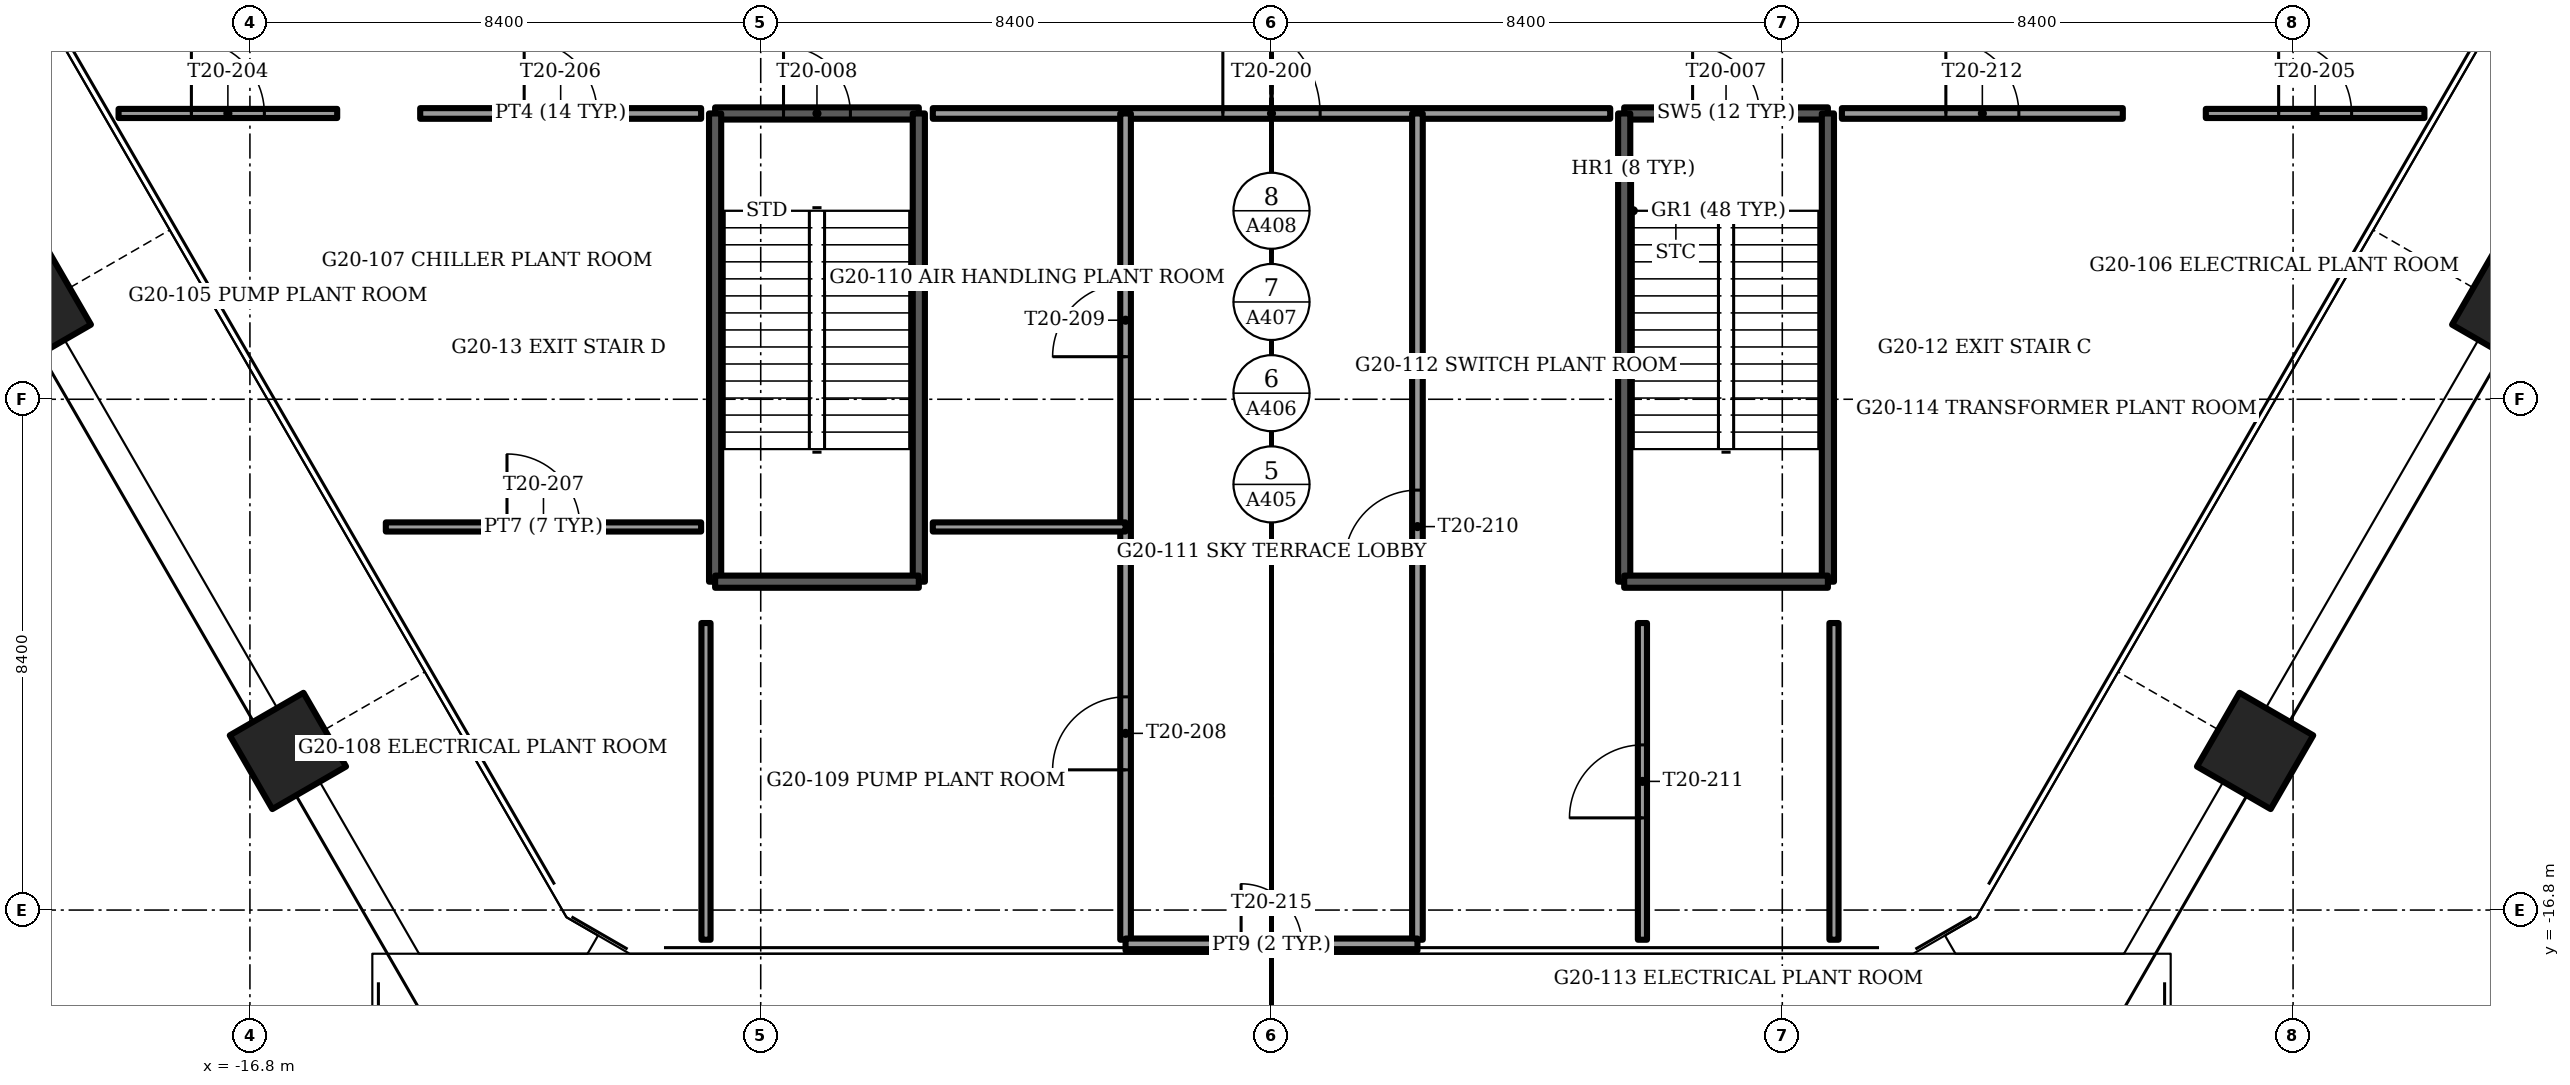
"""IFC4 building model, lengths in metres.
Left out: names, types, materials, properties, quantities, classifications, styles, units other than length and angle.
Written with IfcOpenShell. Run it as: python <this file> out.ifc"""

import sys

from ifc_helpers import new_model, si_unit, direction, frame, frame_2d, origin, origin_2d, place, context, subcontext, project, spatial, rectangle, extrude, element, fill, save


model = new_model("IFC4")
c1 = context("Model", 3, precision=1e-05, world=origin(), true_north=direction((0.0, 1.0)))
c2 = subcontext(c1, "Body", "Model", "MODEL_VIEW")
j1 = project(units=[si_unit("LENGTHUNIT", "METRE"), si_unit("PLANEANGLEUNIT", "RADIAN")], contexts=[c1])
p1 = place(None, origin())
s1 = spatial("IfcSite", under=j1, at=p1, CompositionType="ELEMENT")
p2 = place(p1, origin())
s2 = spatial("IfcBuilding", under=s1, at=p2, CompositionType="ELEMENT")
p3 = place(p2, frame((0.0, 0.0, 80.5)))
s3 = spatial("IfcBuildingStorey", under=s2, at=p3, CompositionType="ELEMENT", Elevation=80.5)
for number, where, z_axis, x_axis in (
    (1, (-20.371, -6.917, -1.2), (0.0, 0.0, 1.0), (-0.5, 0.866, 0.0)),
    (2, (-16.175, -14.183, -1.2), (0.0, 0.0, 1.0), (-0.5, 0.866, 0.0)),
    (3, (16.175, -14.183, -1.2), (0.0, 0.0, 1.0), (-0.5, -0.866, 0.0)),
    (4, (20.371, -6.917, -1.2), (0.0, 0.0, 1.0), (-0.5, -0.866, 0.0)),
):
    element("IfcColumn", number, at=place(p3, frame(where, z_axis=z_axis, x_axis=x_axis)), inside=s3, PredefinedType="COLUMN", context=c2, shape_type="SweptSolid", body=[
        extrude(rectangle(XDim=1.4, YDim=1.4, at=origin_2d()), origin(), (0.0, 0.0, 1.0), 5.0),
    ])
p4 = place(p3, frame((5.8, -3.7, -0.3), z_axis=(0.0, 0.0, 1.0), x_axis=(1.0, 0.0, 0.0)))
e5 = element("IfcWall", 5, at=p4, inside=s3, PredefinedType="SOLIDWALL", context=c2, shape_type="SweptSolid", body=[
    extrude(rectangle(XDim=3.35, YDim=0.2, at=frame_2d((1.675, 0.0))), origin(), (0.0, 0.0, 1.0), 5.0),
])
p5 = place(p4, frame((1.125, 0.0, 0.0)))
e6 = element("IfcOpeningElement", 6, at=p5, cuts=e5, PredefinedType="OPENING", context=c2, shape_type="SweptSolid", body=[
    extrude(rectangle(XDim=1.1, YDim=2.1, at=frame_2d((0.55, 1.05))), frame((0.0, 0.1, 0.0), z_axis=(0.0, -1.0, 0.0), x_axis=(1.0, 0.0, 0.0)), (0.0, 0.0, 1.0), 0.2),
])
for number, where, z_axis, x_axis in (
    (7, (5.8, -3.7, -0.3), (0.0, 0.0, 1.0), (0.0, -1.0, 0.0)),
    (8, (9.15, -3.7, -0.3), (0.0, 0.0, 1.0), (0.0, -1.0, 0.0)),
):
    element("IfcWall", number, at=place(p3, frame(where, z_axis=z_axis, x_axis=x_axis)), inside=s3, PredefinedType="SOLIDWALL", context=c2, shape_type="SweptSolid", body=[
        extrude(rectangle(XDim=7.7, YDim=0.2, at=frame_2d((3.85, 0.0))), origin(), (0.0, 0.0, 1.0), 5.0),
    ])
p6 = place(p3, frame((5.8, -11.4, -0.3), z_axis=(0.0, 0.0, 1.0), x_axis=(1.0, 0.0, 0.0)))
e9 = element("IfcWall", 9, at=p6, inside=s3, PredefinedType="SOLIDWALL", context=c2, shape_type="SweptSolid", body=[
    extrude(rectangle(XDim=3.35, YDim=0.2, at=frame_2d((1.675, 0.0))), origin(), (0.0, 0.0, 1.0), 5.0),
])
p7 = place(p3, frame((-9.15, -3.7, -0.3), z_axis=(0.0, 0.0, 1.0), x_axis=(1.0, 0.0, 0.0)))
e10 = element("IfcWall", 10, at=p7, inside=s3, PredefinedType="SOLIDWALL", context=c2, shape_type="SweptSolid", body=[
    extrude(rectangle(XDim=3.35, YDim=0.2, at=frame_2d((1.675, 0.0))), origin(), (0.0, 0.0, 1.0), 5.0),
])
p8 = place(p7, frame((1.125, 0.0, 0.0)))
e11 = element("IfcOpeningElement", 11, at=p8, cuts=e10, PredefinedType="OPENING", context=c2, shape_type="SweptSolid", body=[
    extrude(rectangle(XDim=1.1, YDim=2.1, at=frame_2d((0.55, 1.05))), frame((0.0, 0.1, 0.0), z_axis=(0.0, -1.0, 0.0), x_axis=(1.0, 0.0, 0.0)), (0.0, 0.0, 1.0), 0.2),
])
for number, where, z_axis, x_axis in (
    (12, (-9.15, -3.7, -0.3), (0.0, 0.0, 1.0), (0.0, -1.0, 0.0)),
    (13, (-5.8, -3.7, -0.3), (0.0, 0.0, 1.0), (0.0, -1.0, 0.0)),
):
    element("IfcWall", number, at=place(p3, frame(where, z_axis=z_axis, x_axis=x_axis)), inside=s3, PredefinedType="SOLIDWALL", context=c2, shape_type="SweptSolid", body=[
        extrude(rectangle(XDim=7.7, YDim=0.2, at=frame_2d((3.85, 0.0))), origin(), (0.0, 0.0, 1.0), 5.0),
    ])
p9 = place(p3, frame((-9.15, -11.4, -0.3), z_axis=(0.0, 0.0, 1.0), x_axis=(1.0, 0.0, 0.0)))
e14 = element("IfcWall", 14, at=p9, inside=s3, PredefinedType="SOLIDWALL", context=c2, shape_type="SweptSolid", body=[
    extrude(rectangle(XDim=3.35, YDim=0.2, at=frame_2d((1.675, 0.0))), origin(), (0.0, 0.0, 1.0), 5.0),
])
p10 = place(p3, frame((-14.0, -3.7, 0.0), z_axis=(0.0, 0.0, 1.0), x_axis=(1.0, 0.0, 0.0)))
e15 = element("IfcWall", 15, at=p10, inside=s3, PredefinedType="PARTITIONING", context=c2, shape_type="SweptSolid", body=[
    extrude(rectangle(XDim=4.62, YDim=0.175, at=frame_2d((2.31, 0.0))), origin(), (0.0, 0.0, 1.0), 4.7),
])
p11 = place(p10, frame((1.71, 0.0, 0.0)))
e16 = element("IfcOpeningElement", 16, at=p11, cuts=e15, PredefinedType="OPENING", context=c2, shape_type="SweptSolid", body=[
    extrude(rectangle(XDim=1.2, YDim=2.1, at=frame_2d((0.6, 1.05))), frame((0.0, 0.087, 0.0), z_axis=(0.0, -1.0, 0.0), x_axis=(1.0, 0.0, 0.0)), (0.0, 0.0, 1.0), 0.175),
])
p12 = place(p3, frame((-5.57, -3.7, 0.0), z_axis=(0.0, 0.0, 1.0), x_axis=(1.0, 0.0, 0.0)))
e17 = element("IfcWall", 17, at=p12, inside=s3, PredefinedType="PARTITIONING", context=c2, shape_type="SweptSolid", body=[
    extrude(rectangle(XDim=11.14, YDim=0.175, at=frame_2d((5.57, 0.0))), origin(), (0.0, 0.0, 1.0), 4.7),
])
p13 = place(p12, frame((4.77, 0.0, 0.0)))
e18 = element("IfcOpeningElement", 18, at=p13, cuts=e17, PredefinedType="OPENING", context=c2, shape_type="SweptSolid", body=[
    extrude(rectangle(XDim=1.6, YDim=2.1, at=frame_2d((0.8, 1.05))), frame((0.0, 0.087, 0.0), z_axis=(0.0, -1.0, 0.0), x_axis=(1.0, 0.0, 0.0)), (0.0, 0.0, 1.0), 0.175),
])
p14 = place(p3, frame((9.38, -3.7, 0.0), z_axis=(0.0, 0.0, 1.0), x_axis=(1.0, 0.0, 0.0)))
e19 = element("IfcWall", 19, at=p14, inside=s3, PredefinedType="PARTITIONING", context=c2, shape_type="SweptSolid", body=[
    extrude(rectangle(XDim=4.62, YDim=0.175, at=frame_2d((2.31, 0.0))), origin(), (0.0, 0.0, 1.0), 4.7),
])
p15 = place(p14, frame((1.71, 0.0, 0.0)))
e20 = element("IfcOpeningElement", 20, at=p15, cuts=e19, PredefinedType="OPENING", context=c2, shape_type="SweptSolid", body=[
    extrude(rectangle(XDim=1.2, YDim=2.1, at=frame_2d((0.6, 1.05))), frame((0.0, 0.087, 0.0), z_axis=(0.0, -1.0, 0.0), x_axis=(1.0, 0.0, 0.0)), (0.0, 0.0, 1.0), 0.175),
])
p16 = place(p3, frame((-2.4, -17.288, 0.0), z_axis=(0.0, 0.0, 1.0), x_axis=(0.0, 1.0, 0.0)))
e21 = element("IfcWall", 21, at=p16, inside=s3, PredefinedType="PARTITIONING", context=c2, shape_type="SweptSolid", body=[
    extrude(rectangle(XDim=13.588, YDim=0.175, at=frame_2d((6.794, 0.0))), origin(), (0.0, 0.0, 1.0), 4.7),
])
p17 = place(p16, frame((2.794, 0.0, 0.0)))
e22 = element("IfcOpeningElement", 22, at=p17, cuts=e21, PredefinedType="OPENING", context=c2, shape_type="SweptSolid", body=[
    extrude(rectangle(XDim=1.2, YDim=2.1, at=frame_2d((0.6, 1.05))), frame((0.0, 0.087, 0.0), z_axis=(0.0, -1.0, 0.0), x_axis=(1.0, 0.0, 0.0)), (0.0, 0.0, 1.0), 0.175),
])
p18 = place(p16, frame((9.588, 0.0, 0.0)))
e23 = element("IfcOpeningElement", 23, at=p18, cuts=e21, PredefinedType="OPENING", context=c2, shape_type="SweptSolid", body=[
    extrude(rectangle(XDim=1.2, YDim=2.1, at=frame_2d((0.6, 1.05))), frame((0.0, 0.087, 0.0), z_axis=(0.0, -1.0, 0.0), x_axis=(1.0, 0.0, 0.0)), (0.0, 0.0, 1.0), 0.175),
])
p19 = place(p3, frame((2.4, -17.288, 0.0), z_axis=(0.0, 0.0, 1.0), x_axis=(0.0, 1.0, 0.0)))
e24 = element("IfcWall", 24, at=p19, inside=s3, PredefinedType="PARTITIONING", context=c2, shape_type="SweptSolid", body=[
    extrude(rectangle(XDim=13.588, YDim=0.175, at=frame_2d((6.794, 0.0))), origin(), (0.0, 0.0, 1.0), 4.7),
])
p20 = place(p19, frame((6.194, 0.0, 0.0)))
e25 = element("IfcOpeningElement", 25, at=p20, cuts=e24, PredefinedType="OPENING", context=c2, shape_type="SweptSolid", body=[
    extrude(rectangle(XDim=1.2, YDim=2.1, at=frame_2d((0.6, 1.05))), frame((0.0, 0.087, 0.0), z_axis=(0.0, -1.0, 0.0), x_axis=(1.0, 0.0, 0.0)), (0.0, 0.0, 1.0), 0.175),
])
p21 = place(p3, frame((-14.565, -10.5, 0.0), z_axis=(0.0, 0.0, 1.0), x_axis=(1.0, 0.0, 0.0)))
e26 = element("IfcWall", 26, at=p21, inside=s3, PredefinedType="PARTITIONING", context=c2, shape_type="SweptSolid", body=[
    extrude(rectangle(XDim=5.185, YDim=0.15, at=frame_2d((2.593, 0.0))), origin(), (0.0, 0.0, 1.0), 4.7),
])
p22 = place(p21, frame((1.992, 0.0, 0.0)))
e27 = element("IfcOpeningElement", 27, at=p22, cuts=e26, PredefinedType="OPENING", context=c2, shape_type="SweptSolid", body=[
    extrude(rectangle(XDim=1.2, YDim=2.1, at=frame_2d((0.6, 1.05))), frame((0.0, 0.075, 0.0), z_axis=(0.0, -1.0, 0.0), x_axis=(1.0, 0.0, 0.0)), (0.0, 0.0, 1.0), 0.15),
])
p23 = place(p3, frame((-5.57, -10.5, 0.0), z_axis=(0.0, 0.0, 1.0), x_axis=(1.0, 0.0, 0.0)))
e28 = element("IfcWall", 28, at=p23, inside=s3, PredefinedType="PARTITIONING", context=c2, shape_type="SweptSolid", body=[
    extrude(rectangle(XDim=3.17, YDim=0.15, at=frame_2d((1.585, 0.0))), origin(), (0.0, 0.0, 1.0), 4.7),
])
p24 = place(p3, frame((-18.96, -3.7, 0.0), z_axis=(0.0, 0.0, 1.0), x_axis=(1.0, 0.0, 0.0)))
e29 = element("IfcWall", 29, at=p24, inside=s3, PredefinedType="PARTITIONING", context=c2, shape_type="SweptSolid", body=[
    extrude(rectangle(XDim=3.595, YDim=0.15, at=frame_2d((1.798, 0.0))), origin(), (0.0, 0.0, 1.0), 4.7),
])
p25 = place(p24, frame((1.198, 0.0, 0.0)))
e30 = element("IfcOpeningElement", 30, at=p25, cuts=e29, PredefinedType="OPENING", context=c2, shape_type="SweptSolid", body=[
    extrude(rectangle(XDim=1.2, YDim=2.1, at=frame_2d((0.6, 1.05))), frame((0.0, 0.075, 0.0), z_axis=(0.0, -1.0, 0.0), x_axis=(1.0, 0.0, 0.0)), (0.0, 0.0, 1.0), 0.15),
])
p26 = place(p3, frame((15.365, -3.7, 0.0), z_axis=(0.0, 0.0, 1.0), x_axis=(1.0, 0.0, 0.0)))
e31 = element("IfcWall", 31, at=p26, inside=s3, PredefinedType="PARTITIONING", context=c2, shape_type="SweptSolid", body=[
    extrude(rectangle(XDim=3.595, YDim=0.15, at=frame_2d((1.798, 0.0))), origin(), (0.0, 0.0, 1.0), 4.7),
])
p27 = place(p26, frame((1.198, 0.0, 0.0)))
e32 = element("IfcOpeningElement", 32, at=p27, cuts=e31, PredefinedType="OPENING", context=c2, shape_type="SweptSolid", body=[
    extrude(rectangle(XDim=1.2, YDim=2.1, at=frame_2d((0.6, 1.05))), frame((0.0, 0.075, 0.0), z_axis=(0.0, -1.0, 0.0), x_axis=(1.0, 0.0, 0.0)), (0.0, 0.0, 1.0), 0.15),
])
p28 = place(p3, frame((-9.3, -17.288, 0.0), z_axis=(0.0, 0.0, 1.0), x_axis=(0.0, 1.0, 0.0)))
e33 = element("IfcWall", 33, at=p28, inside=s3, PredefinedType="PARTITIONING", context=c2, shape_type="SweptSolid", body=[
    extrude(rectangle(XDim=5.208, YDim=0.15, at=frame_2d((2.604, 0.0))), origin(), (0.0, 0.0, 1.0), 4.7),
])
p29 = place(p3, frame((6.1, -17.288, 0.0), z_axis=(0.0, 0.0, 1.0), x_axis=(0.0, 1.0, 0.0)))
e34 = element("IfcWall", 34, at=p29, inside=s3, PredefinedType="PARTITIONING", context=c2, shape_type="SweptSolid", body=[
    extrude(rectangle(XDim=5.208, YDim=0.15, at=frame_2d((2.604, 0.0))), origin(), (0.0, 0.0, 1.0), 4.7),
])
p30 = place(p29, frame((2.004, 0.0, 0.0)))
e35 = element("IfcOpeningElement", 35, at=p30, cuts=e34, PredefinedType="OPENING", context=c2, shape_type="SweptSolid", body=[
    extrude(rectangle(XDim=1.2, YDim=2.1, at=frame_2d((0.6, 1.05))), frame((0.0, 0.075, 0.0), z_axis=(0.0, -1.0, 0.0), x_axis=(1.0, 0.0, 0.0)), (0.0, 0.0, 1.0), 0.15),
])
p31 = place(p3, frame((9.25, -17.288, 0.0), z_axis=(0.0, 0.0, 1.0), x_axis=(0.0, 1.0, 0.0)))
e36 = element("IfcWall", 36, at=p31, inside=s3, PredefinedType="PARTITIONING", context=c2, shape_type="SweptSolid", body=[
    extrude(rectangle(XDim=5.208, YDim=0.15, at=frame_2d((2.604, 0.0))), origin(), (0.0, 0.0, 1.0), 4.7),
])
p32 = place(p3, frame((-2.4, -17.368, 0.0), z_axis=(0.0, 0.0, 1.0), x_axis=(1.0, 0.0, 0.0)))
e37 = element("IfcWall", 37, at=p32, inside=s3, PredefinedType="PARTITIONING", context=c2, shape_type="SweptSolid", body=[
    extrude(rectangle(XDim=4.8, YDim=0.2, at=frame_2d((2.4, 0.0))), origin(), (0.0, 0.0, 1.0), 4.7),
])
p33 = place(p32, frame((1.9, 0.0, 0.0)))
e38 = element("IfcOpeningElement", 38, at=p33, cuts=e37, PredefinedType="OPENING", context=c2, shape_type="SweptSolid", body=[
    extrude(rectangle(XDim=1.0, YDim=2.1, at=frame_2d((0.5, 1.05))), frame((0.0, 0.1, 0.0), z_axis=(0.0, -1.0, 0.0), x_axis=(1.0, 0.0, 0.0)), (0.0, 0.0, 1.0), 0.2),
])
p34 = place(p5, origin())
e39 = element("IfcDoor", 39, at=p34, inside=s3, OperationType="SINGLE_SWING_LEFT", PredefinedType="DOOR", context=c2, shape_type="SweptSolid", body=[
    extrude(rectangle(XDim=1.1, YDim=2.1, at=frame_2d((0.55, 1.05))), frame((0.0, 0.025, 0.0), z_axis=(0.0, -1.0, 0.0), x_axis=(1.0, 0.0, 0.0)), (0.0, 0.0, 1.0), 0.05),
])
fill(e6, e39)
p35 = place(p8, origin())
e40 = element("IfcDoor", 40, at=p35, inside=s3, OperationType="SINGLE_SWING_LEFT", PredefinedType="DOOR", context=c2, shape_type="SweptSolid", body=[
    extrude(rectangle(XDim=1.1, YDim=2.1, at=frame_2d((0.55, 1.05))), frame((0.0, 0.025, 0.0), z_axis=(0.0, -1.0, 0.0), x_axis=(1.0, 0.0, 0.0)), (0.0, 0.0, 1.0), 0.05),
])
fill(e11, e40)
p36 = place(p13, origin())
e41 = element("IfcDoor", 41, at=p36, inside=s3, OperationType="DOUBLE_DOOR_SINGLE_SWING", PredefinedType="DOOR", context=c2, shape_type="SweptSolid", body=[
    extrude(rectangle(XDim=1.6, YDim=2.1, at=frame_2d((0.8, 1.05))), frame((0.0, 0.025, 0.0), z_axis=(0.0, -1.0, 0.0), x_axis=(1.0, 0.0, 0.0)), (0.0, 0.0, 1.0), 0.05),
])
fill(e18, e41)
p37 = place(p25, origin())
e42 = element("IfcDoor", 42, at=p37, inside=s3, OperationType="SINGLE_SWING_RIGHT", PredefinedType="DOOR", context=c2, shape_type="SweptSolid", body=[
    extrude(rectangle(XDim=1.2, YDim=2.1, at=frame_2d((0.6, 1.05))), frame((0.0, 0.025, 0.0), z_axis=(0.0, -1.0, 0.0), x_axis=(1.0, 0.0, 0.0)), (0.0, 0.0, 1.0), 0.05),
])
fill(e30, e42)
p38 = place(p27, origin())
e43 = element("IfcDoor", 43, at=p38, inside=s3, OperationType="SINGLE_SWING_LEFT", PredefinedType="DOOR", context=c2, shape_type="SweptSolid", body=[
    extrude(rectangle(XDim=1.2, YDim=2.1, at=frame_2d((0.6, 1.05))), frame((0.0, 0.025, 0.0), z_axis=(0.0, -1.0, 0.0), x_axis=(1.0, 0.0, 0.0)), (0.0, 0.0, 1.0), 0.05),
])
fill(e32, e43)
p39 = place(p11, origin())
e44 = element("IfcDoor", 44, at=p39, inside=s3, OperationType="SINGLE_SWING_RIGHT", PredefinedType="DOOR", context=c2, shape_type="SweptSolid", body=[
    extrude(rectangle(XDim=1.2, YDim=2.1, at=frame_2d((0.6, 1.05))), frame((0.0, 0.025, 0.0), z_axis=(0.0, -1.0, 0.0), x_axis=(1.0, 0.0, 0.0)), (0.0, 0.0, 1.0), 0.05),
])
fill(e16, e44)
p40 = place(p22, origin())
e45 = element("IfcDoor", 45, at=p40, inside=s3, OperationType="SINGLE_SWING_LEFT", PredefinedType="DOOR", context=c2, shape_type="SweptSolid", body=[
    extrude(rectangle(XDim=1.2, YDim=2.1, at=frame_2d((0.6, 1.05))), frame((0.0, 0.025, 0.0), z_axis=(0.0, -1.0, 0.0), x_axis=(1.0, 0.0, 0.0)), (0.0, 0.0, 1.0), 0.05),
])
fill(e27, e45)
p41 = place(p17, origin())
e46 = element("IfcDoor", 46, at=p41, inside=s3, OperationType="SINGLE_SWING_RIGHT", PredefinedType="DOOR", context=c2, shape_type="SweptSolid", body=[
    extrude(rectangle(XDim=1.2, YDim=2.1, at=frame_2d((0.6, 1.05))), frame((0.0, 0.025, 0.0), z_axis=(0.0, -1.0, 0.0), x_axis=(1.0, 0.0, 0.0)), (0.0, 0.0, 1.0), 0.05),
])
fill(e22, e46)
p42 = place(p18, origin())
e47 = element("IfcDoor", 47, at=p42, inside=s3, OperationType="SINGLE_SWING_LEFT", PredefinedType="DOOR", context=c2, shape_type="SweptSolid", body=[
    extrude(rectangle(XDim=1.2, YDim=2.1, at=frame_2d((0.6, 1.05))), frame((0.0, 0.025, 0.0), z_axis=(0.0, -1.0, 0.0), x_axis=(1.0, 0.0, 0.0)), (0.0, 0.0, 1.0), 0.05),
])
fill(e23, e47)
p43 = place(p20, origin())
e48 = element("IfcDoor", 48, at=p43, inside=s3, OperationType="SINGLE_SWING_RIGHT", PredefinedType="DOOR", context=c2, shape_type="SweptSolid", body=[
    extrude(rectangle(XDim=1.2, YDim=2.1, at=frame_2d((0.6, 1.05))), frame((0.0, 0.025, 0.0), z_axis=(0.0, -1.0, 0.0), x_axis=(1.0, 0.0, 0.0)), (0.0, 0.0, 1.0), 0.05),
])
fill(e25, e48)
p44 = place(p30, origin())
e49 = element("IfcDoor", 49, at=p44, inside=s3, OperationType="SINGLE_SWING_LEFT", PredefinedType="DOOR", context=c2, shape_type="SweptSolid", body=[
    extrude(rectangle(XDim=1.2, YDim=2.1, at=frame_2d((0.6, 1.05))), frame((0.0, 0.025, 0.0), z_axis=(0.0, -1.0, 0.0), x_axis=(1.0, 0.0, 0.0)), (0.0, 0.0, 1.0), 0.05),
])
fill(e35, e49)
p45 = place(p15, origin())
e50 = element("IfcDoor", 50, at=p45, inside=s3, OperationType="SINGLE_SWING_RIGHT", PredefinedType="DOOR", context=c2, shape_type="SweptSolid", body=[
    extrude(rectangle(XDim=1.2, YDim=2.1, at=frame_2d((0.6, 1.05))), frame((0.0, 0.025, 0.0), z_axis=(0.0, -1.0, 0.0), x_axis=(1.0, 0.0, 0.0)), (0.0, 0.0, 1.0), 0.05),
])
fill(e20, e50)
p46 = place(p33, origin())
e51 = element("IfcDoor", 51, at=p46, inside=s3, OperationType="SINGLE_SWING_LEFT", PredefinedType="DOOR", context=c2, shape_type="SweptSolid", body=[
    extrude(rectangle(XDim=1.0, YDim=2.1, at=frame_2d((0.5, 1.05))), frame((0.0, 0.025, 0.0), z_axis=(0.0, -1.0, 0.0), x_axis=(1.0, 0.0, 0.0)), (0.0, 0.0, 1.0), 0.05),
])
fill(e38, e51)
save(model, sys.argv[1])
